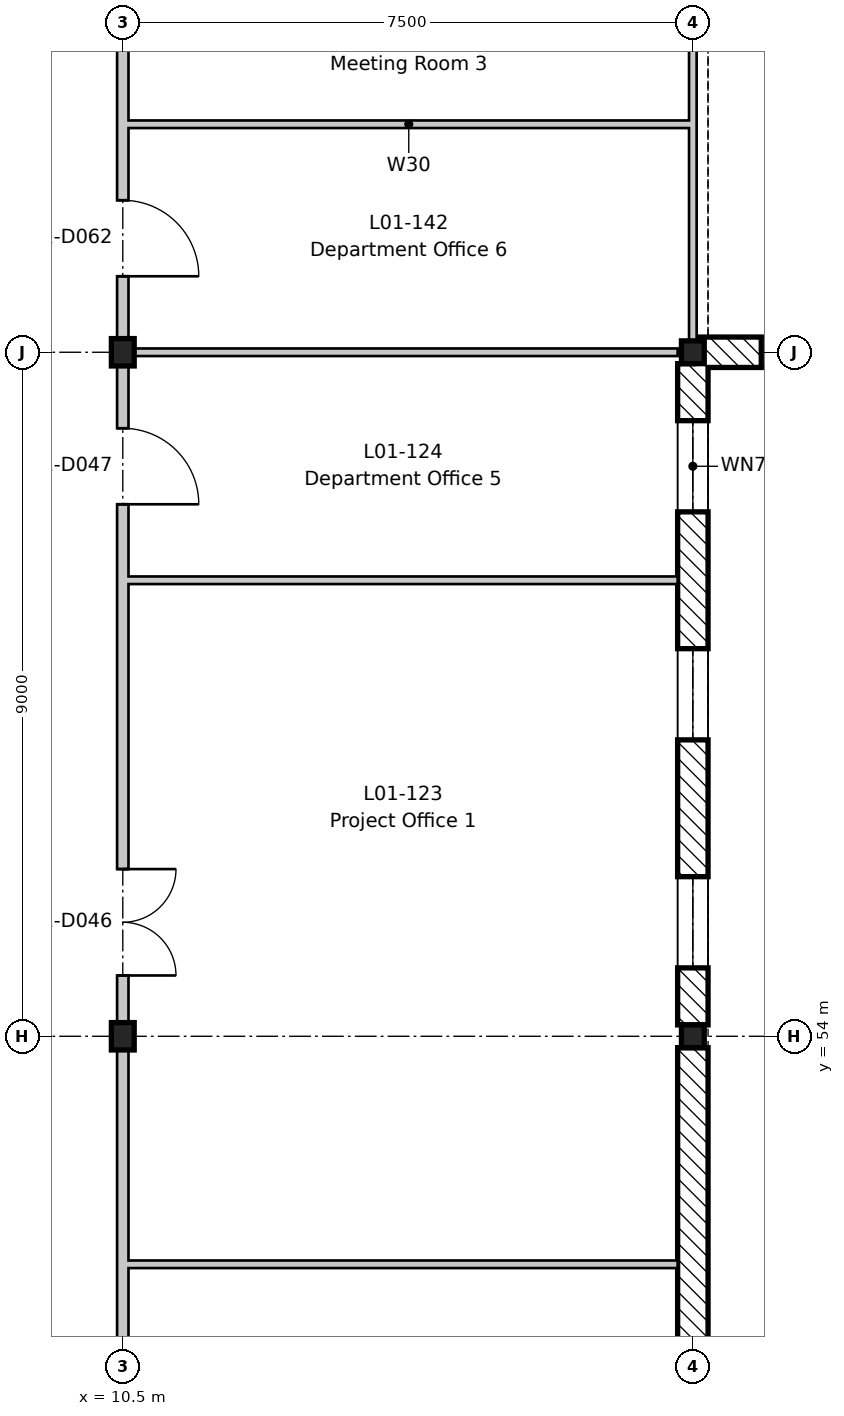
"""IFC4 building model, lengths in metres.
Left out: names, types, materials, properties, quantities, classifications, styles, units other than length and angle.
Written with IfcOpenShell. Run it as: python <this file> out.ifc"""

import sys

from ifc_helpers import new_model, si_unit, direction, frame, frame_2d, origin, origin_2d, place, context, subcontext, project, spatial, rectangle, i_section, extrude, element, fill, save


model = new_model("IFC4")
c1 = context("Model", 3, precision=1e-05, world=origin(), true_north=direction((0.0, 1.0)))
c2 = subcontext(c1, "Body", "Model", "MODEL_VIEW")
j1 = project(units=[si_unit("LENGTHUNIT", "METRE"), si_unit("PLANEANGLEUNIT", "RADIAN")], contexts=[c1])
p1 = place(None, origin())
s1 = spatial("IfcSite", under=j1, at=p1, CompositionType="ELEMENT")
p2 = place(p1, origin())
s2 = spatial("IfcBuilding", under=s1, at=p2, CompositionType="ELEMENT")
p3 = place(p2, frame((0.0, 0.0, 5.4)))
s3 = spatial("IfcBuildingStorey", under=s2, at=p3, CompositionType="ELEMENT", Elevation=5.4)
for number, where, z_axis, x_axis in (
    (1, (10.5, 54.0, -0.2), (0.0, 0.0, 1.0), (1.0, 0.0, 0.0)),
    (2, (10.5, 63.0, -0.2), (0.0, 0.0, 1.0), (1.0, 0.0, 0.0)),
):
    element("IfcColumn", number, at=place(p3, frame(where, z_axis=z_axis, x_axis=x_axis)), inside=s3, PredefinedType="COLUMN", context=c2, shape_type="SweptSolid", body=[
        extrude(i_section(OverallWidth=0.3, OverallDepth=0.36, WebThickness=0.012, FlangeThickness=0.022, FilletRadius=0.027, at=origin_2d()), origin(), (0.0, 0.0, 1.0), 4.5),
    ])
for number, where, z_axis, x_axis in (
    (3, (18.0, 54.0, -0.2), (0.0, 0.0, 1.0), (1.0, 0.0, 0.0)),
    (4, (18.0, 63.0, -0.2), (0.0, 0.0, 1.0), (1.0, 0.0, 0.0)),
):
    element("IfcColumn", number, at=place(p3, frame(where, z_axis=z_axis, x_axis=x_axis)), inside=s3, PredefinedType="COLUMN", context=c2, shape_type="SweptSolid", body=[
        extrude(i_section(OverallWidth=0.3, OverallDepth=0.3, WebThickness=0.011, FlangeThickness=0.019, FilletRadius=0.027, at=origin_2d()), origin(), (0.0, 0.0, 1.0), 4.5),
    ])
p4 = place(p3, frame((18.0, 53.85, 0.0), z_axis=(0.0, 0.0, 1.0), x_axis=(0.0, -1.0, 0.0)))
e5 = element("IfcWall", 5, at=p4, inside=s3, PredefinedType="STANDARD", context=c2, shape_type="SweptSolid", body=[
    extrude(rectangle(XDim=8.7, YDim=0.4, at=frame_2d((4.35, 0.0))), origin(), (0.0, 0.0, 1.0), 3.9),
])
p5 = place(p3, frame((18.0, 62.85, 0.0), z_axis=(0.0, 0.0, 1.0), x_axis=(0.0, -1.0, 0.0)))
e6 = element("IfcWall", 6, at=p5, inside=s3, PredefinedType="STANDARD", context=c2, shape_type="SweptSolid", body=[
    extrude(rectangle(XDim=8.7, YDim=0.4, at=frame_2d((4.35, 0.0))), origin(), (0.0, 0.0, 1.0), 3.9),
])
p6 = place(p5, frame((6.75, 0.0, 0.9)))
e7 = element("IfcOpeningElement", 7, at=p6, cuts=e6, PredefinedType="OPENING", context=c2, shape_type="SweptSolid", body=[
    extrude(rectangle(XDim=1.2, YDim=2.4, at=frame_2d((0.6, 1.2))), frame((0.0, 0.21, 0.0), z_axis=(0.0, -1.0, 0.0), x_axis=(1.0, 0.0, 0.0)), (0.0, 0.0, 1.0), 0.42),
])
p7 = place(p5, frame((3.75, 0.0, 0.9)))
e8 = element("IfcOpeningElement", 8, at=p7, cuts=e6, PredefinedType="OPENING", context=c2, shape_type="SweptSolid", body=[
    extrude(rectangle(XDim=1.2, YDim=2.4, at=frame_2d((0.6, 1.2))), frame((0.0, 0.21, 0.0), z_axis=(0.0, -1.0, 0.0), x_axis=(1.0, 0.0, 0.0)), (0.0, 0.0, 1.0), 0.42),
])
p8 = place(p5, frame((0.75, 0.0, 0.9)))
e9 = element("IfcOpeningElement", 9, at=p8, cuts=e6, PredefinedType="OPENING", context=c2, shape_type="SweptSolid", body=[
    extrude(rectangle(XDim=1.2, YDim=2.4, at=frame_2d((0.6, 1.2))), frame((0.0, 0.21, 0.0), z_axis=(0.0, -1.0, 0.0), x_axis=(1.0, 0.0, 0.0)), (0.0, 0.0, 1.0), 0.42),
])
p9 = place(p3, frame((26.991, 63.0, 0.0), z_axis=(0.0, 0.0, 1.0), x_axis=(-1.0, 0.0, 0.0)))
e10 = element("IfcWall", 10, at=p9, inside=s3, PredefinedType="STANDARD", context=c2, shape_type="SweptSolid", body=[
    extrude(rectangle(XDim=8.98, YDim=0.4, at=frame_2d((4.49, 0.0))), origin(), (0.0, 0.0, 1.0), 3.9),
])
p10 = place(p9, frame((6.891, 0.0, 0.9)))
e11 = element("IfcOpeningElement", 11, at=p10, cuts=e10, PredefinedType="OPENING", context=c2, shape_type="SweptSolid", body=[
    extrude(rectangle(XDim=1.2, YDim=2.4, at=frame_2d((0.6, 1.2))), frame((0.0, 0.21, 0.0), z_axis=(0.0, -1.0, 0.0), x_axis=(1.0, 0.0, 0.0)), (0.0, 0.0, 1.0), 0.42),
])
p11 = place(p9, frame((3.891, 0.0, 0.9)))
e12 = element("IfcOpeningElement", 12, at=p11, cuts=e10, PredefinedType="OPENING", context=c2, shape_type="SweptSolid", body=[
    extrude(rectangle(XDim=1.2, YDim=2.4, at=frame_2d((0.6, 1.2))), frame((0.0, 0.21, 0.0), z_axis=(0.0, -1.0, 0.0), x_axis=(1.0, 0.0, 0.0)), (0.0, 0.0, 1.0), 0.42),
])
p12 = place(p9, frame((0.891, 0.0, 0.9)))
e13 = element("IfcOpeningElement", 13, at=p12, cuts=e10, PredefinedType="OPENING", context=c2, shape_type="SweptSolid", body=[
    extrude(rectangle(XDim=1.2, YDim=2.4, at=frame_2d((0.6, 1.2))), frame((0.0, 0.21, 0.0), z_axis=(0.0, -1.0, 0.0), x_axis=(1.0, 0.0, 0.0)), (0.0, 0.0, 1.0), 0.42),
])
for number, where, z_axis, x_axis in (
    (14, (10.575, 51.0, 0.0), (0.0, 0.0, 1.0), (1.0, 0.0, 0.0)),
    (15, (10.575, 60.0, 0.0), (0.0, 0.0, 1.0), (1.0, 0.0, 0.0)),
):
    element("IfcWall", number, at=place(p3, frame(where, z_axis=z_axis, x_axis=x_axis)), inside=s3, PredefinedType="PARTITIONING", context=c2, shape_type="SweptSolid", body=[
        extrude(rectangle(XDim=7.225, YDim=0.1, at=frame_2d((3.613, 0.0))), origin(), (0.0, 0.0, 1.0), 4.3),
    ])
p13 = place(p3, frame((10.575, 63.0, 0.0), z_axis=(0.0, 0.0, 1.0), x_axis=(1.0, 0.0, 0.0)))
e16 = element("IfcWall", 16, at=p13, inside=s3, PredefinedType="PARTITIONING", context=c2, shape_type="SweptSolid", body=[
    extrude(rectangle(XDim=7.225, YDim=0.1, at=frame_2d((3.613, 0.0))), origin(), (0.0, 0.0, 1.0), 3.95),
])
p14 = place(p3, frame((10.5, -8.8, 0.0), z_axis=(0.0, 0.0, 1.0), x_axis=(0.0, 1.0, 0.0)))
e17 = element("IfcWall", 17, at=p14, inside=s3, PredefinedType="PARTITIONING", context=c2, shape_type="SweptSolid", body=[
    extrude(rectangle(XDim=79.3, YDim=0.15, at=frame_2d((39.65, 0.0))), origin(), (0.0, 0.0, 1.0), 3.78),
])
p15 = place(p14, frame((0.8, 0.0, 0.0)))
e18 = element("IfcOpeningElement", 18, at=p15, cuts=e17, PredefinedType="OPENING", context=c2, shape_type="SweptSolid", body=[
    extrude(rectangle(XDim=1.0, YDim=2.1, at=frame_2d((0.5, 1.05))), frame((0.0, 0.085, 0.0), z_axis=(0.0, -1.0, 0.0), x_axis=(1.0, 0.0, 0.0)), (0.0, 0.0, 1.0), 0.17),
])
p16 = place(p14, frame((5.3, 0.0, 0.0)))
e19 = element("IfcOpeningElement", 19, at=p16, cuts=e17, PredefinedType="OPENING", context=c2, shape_type="SweptSolid", body=[
    extrude(rectangle(XDim=1.0, YDim=2.1, at=frame_2d((0.5, 1.05))), frame((0.0, 0.085, 0.0), z_axis=(0.0, -1.0, 0.0), x_axis=(1.0, 0.0, 0.0)), (0.0, 0.0, 1.0), 0.17),
])
p17 = place(p14, frame((11.3, 0.0, 0.0)))
e20 = element("IfcOpeningElement", 20, at=p17, cuts=e17, PredefinedType="OPENING", context=c2, shape_type="SweptSolid", body=[
    extrude(rectangle(XDim=1.0, YDim=2.1, at=frame_2d((0.5, 1.05))), frame((0.0, 0.085, 0.0), z_axis=(0.0, -1.0, 0.0), x_axis=(1.0, 0.0, 0.0)), (0.0, 0.0, 1.0), 0.17),
])
p18 = place(p14, frame((15.8, 0.0, 0.0)))
e21 = element("IfcOpeningElement", 21, at=p18, cuts=e17, PredefinedType="OPENING", context=c2, shape_type="SweptSolid", body=[
    extrude(rectangle(XDim=1.0, YDim=2.1, at=frame_2d((0.5, 1.05))), frame((0.0, 0.085, 0.0), z_axis=(0.0, -1.0, 0.0), x_axis=(1.0, 0.0, 0.0)), (0.0, 0.0, 1.0), 0.17),
])
p19 = place(p14, frame((18.8, 0.0, 0.0)))
e22 = element("IfcOpeningElement", 22, at=p19, cuts=e17, PredefinedType="OPENING", context=c2, shape_type="SweptSolid", body=[
    extrude(rectangle(XDim=1.0, YDim=2.1, at=frame_2d((0.5, 1.05))), frame((0.0, 0.085, 0.0), z_axis=(0.0, -1.0, 0.0), x_axis=(1.0, 0.0, 0.0)), (0.0, 0.0, 1.0), 0.17),
])
p20 = place(p14, frame((23.3, 0.0, 0.0)))
e23 = element("IfcOpeningElement", 23, at=p20, cuts=e17, PredefinedType="OPENING", context=c2, shape_type="SweptSolid", body=[
    extrude(rectangle(XDim=1.0, YDim=2.1, at=frame_2d((0.5, 1.05))), frame((0.0, 0.085, 0.0), z_axis=(0.0, -1.0, 0.0), x_axis=(1.0, 0.0, 0.0)), (0.0, 0.0, 1.0), 0.17),
])
p21 = place(p14, frame((29.3, 0.0, 0.0)))
e24 = element("IfcOpeningElement", 24, at=p21, cuts=e17, PredefinedType="OPENING", context=c2, shape_type="SweptSolid", body=[
    extrude(rectangle(XDim=1.0, YDim=2.1, at=frame_2d((0.5, 1.05))), frame((0.0, 0.085, 0.0), z_axis=(0.0, -1.0, 0.0), x_axis=(1.0, 0.0, 0.0)), (0.0, 0.0, 1.0), 0.17),
])
p22 = place(p14, frame((33.8, 0.0, 0.0)))
e25 = element("IfcOpeningElement", 25, at=p22, cuts=e17, PredefinedType="OPENING", context=c2, shape_type="SweptSolid", body=[
    extrude(rectangle(XDim=1.0, YDim=2.1, at=frame_2d((0.5, 1.05))), frame((0.0, 0.085, 0.0), z_axis=(0.0, -1.0, 0.0), x_axis=(1.0, 0.0, 0.0)), (0.0, 0.0, 1.0), 0.17),
])
p23 = place(p14, frame((38.3, 0.0, 0.0)))
e26 = element("IfcOpeningElement", 26, at=p23, cuts=e17, PredefinedType="OPENING", context=c2, shape_type="SweptSolid", body=[
    extrude(rectangle(XDim=1.0, YDim=2.1, at=frame_2d((0.5, 1.05))), frame((0.0, 0.085, 0.0), z_axis=(0.0, -1.0, 0.0), x_axis=(1.0, 0.0, 0.0)), (0.0, 0.0, 1.0), 0.17),
])
p24 = place(p14, frame((42.8, 0.0, 0.0)))
e27 = element("IfcOpeningElement", 27, at=p24, cuts=e17, PredefinedType="OPENING", context=c2, shape_type="SweptSolid", body=[
    extrude(rectangle(XDim=1.0, YDim=2.1, at=frame_2d((0.5, 1.05))), frame((0.0, 0.085, 0.0), z_axis=(0.0, -1.0, 0.0), x_axis=(1.0, 0.0, 0.0)), (0.0, 0.0, 1.0), 0.17),
])
p25 = place(p14, frame((45.8, 0.0, 0.0)))
e28 = element("IfcOpeningElement", 28, at=p25, cuts=e17, PredefinedType="OPENING", context=c2, shape_type="SweptSolid", body=[
    extrude(rectangle(XDim=1.0, YDim=2.1, at=frame_2d((0.5, 1.05))), frame((0.0, 0.085, 0.0), z_axis=(0.0, -1.0, 0.0), x_axis=(1.0, 0.0, 0.0)), (0.0, 0.0, 1.0), 0.17),
])
p26 = place(p14, frame((50.3, 0.0, 0.0)))
e29 = element("IfcOpeningElement", 29, at=p26, cuts=e17, PredefinedType="OPENING", context=c2, shape_type="SweptSolid", body=[
    extrude(rectangle(XDim=1.0, YDim=2.1, at=frame_2d((0.5, 1.05))), frame((0.0, 0.085, 0.0), z_axis=(0.0, -1.0, 0.0), x_axis=(1.0, 0.0, 0.0)), (0.0, 0.0, 1.0), 0.17),
])
p27 = place(p14, frame((54.8, 0.0, 0.0)))
e30 = element("IfcOpeningElement", 30, at=p27, cuts=e17, PredefinedType="OPENING", context=c2, shape_type="SweptSolid", body=[
    extrude(rectangle(XDim=1.0, YDim=2.1, at=frame_2d((0.5, 1.05))), frame((0.0, 0.085, 0.0), z_axis=(0.0, -1.0, 0.0), x_axis=(1.0, 0.0, 0.0)), (0.0, 0.0, 1.0), 0.17),
])
p28 = place(p14, frame((57.8, 0.0, 0.0)))
e31 = element("IfcOpeningElement", 31, at=p28, cuts=e17, PredefinedType="OPENING", context=c2, shape_type="SweptSolid", body=[
    extrude(rectangle(XDim=1.0, YDim=2.1, at=frame_2d((0.5, 1.05))), frame((0.0, 0.085, 0.0), z_axis=(0.0, -1.0, 0.0), x_axis=(1.0, 0.0, 0.0)), (0.0, 0.0, 1.0), 0.17),
])
p29 = place(p14, frame((63.6, 0.0, 0.0)))
e32 = element("IfcOpeningElement", 32, at=p29, cuts=e17, PredefinedType="OPENING", context=c2, shape_type="SweptSolid", body=[
    extrude(rectangle(XDim=1.4, YDim=2.1, at=frame_2d((0.7, 1.05))), frame((0.0, 0.085, 0.0), z_axis=(0.0, -1.0, 0.0), x_axis=(1.0, 0.0, 0.0)), (0.0, 0.0, 1.0), 0.17),
])
p30 = place(p14, frame((69.8, 0.0, 0.0)))
e33 = element("IfcOpeningElement", 33, at=p30, cuts=e17, PredefinedType="OPENING", context=c2, shape_type="SweptSolid", body=[
    extrude(rectangle(XDim=1.0, YDim=2.1, at=frame_2d((0.5, 1.05))), frame((0.0, 0.085, 0.0), z_axis=(0.0, -1.0, 0.0), x_axis=(1.0, 0.0, 0.0)), (0.0, 0.0, 1.0), 0.17),
])
p31 = place(p14, frame((72.8, 0.0, 0.0)))
e34 = element("IfcOpeningElement", 34, at=p31, cuts=e17, PredefinedType="OPENING", context=c2, shape_type="SweptSolid", body=[
    extrude(rectangle(XDim=1.0, YDim=2.1, at=frame_2d((0.5, 1.05))), frame((0.0, 0.085, 0.0), z_axis=(0.0, -1.0, 0.0), x_axis=(1.0, 0.0, 0.0)), (0.0, 0.0, 1.0), 0.17),
])
p32 = place(p3, frame((10.575, 66.0, 0.0), z_axis=(0.0, 0.0, 1.0), x_axis=(1.0, 0.0, 0.0)))
e35 = element("IfcWall", 35, at=p32, inside=s3, PredefinedType="PARTITIONING", context=c2, shape_type="SweptSolid", body=[
    extrude(rectangle(XDim=7.375, YDim=0.1, at=frame_2d((3.688, 0.0))), origin(), (0.0, 0.0, 1.0), 4.3),
])
p33 = place(p3, frame((18.0, 63.075, 0.0), z_axis=(0.0, 0.0, 1.0), x_axis=(0.0, 1.0, 0.0)))
e36 = element("IfcWall", 36, at=p33, inside=s3, PredefinedType="PARTITIONING", context=c2, shape_type="SweptSolid", body=[
    extrude(rectangle(XDim=7.35, YDim=0.1, at=frame_2d((3.675, 0.0))), origin(), (0.0, 0.0, 1.0), 3.88),
])
p34 = place(p6, origin())
e37 = element("IfcWindow", 37, at=p34, inside=s3, PartitioningType="SINGLE_PANEL", PredefinedType="WINDOW", context=c2, shape_type="SweptSolid", body=[
    extrude(rectangle(XDim=1.2, YDim=2.4, at=frame_2d((0.6, 1.2))), frame((0.0, -0.12, 0.0), z_axis=(0.0, -1.0, 0.0), x_axis=(1.0, 0.0, 0.0)), (0.0, 0.0, 1.0), 0.06),
])
fill(e7, e37)
p35 = place(p7, origin())
e38 = element("IfcWindow", 38, at=p35, inside=s3, PartitioningType="SINGLE_PANEL", PredefinedType="WINDOW", context=c2, shape_type="SweptSolid", body=[
    extrude(rectangle(XDim=1.2, YDim=2.4, at=frame_2d((0.6, 1.2))), frame((0.0, -0.12, 0.0), z_axis=(0.0, -1.0, 0.0), x_axis=(1.0, 0.0, 0.0)), (0.0, 0.0, 1.0), 0.06),
])
fill(e8, e38)
p36 = place(p8, origin())
e39 = element("IfcWindow", 39, at=p36, inside=s3, PartitioningType="SINGLE_PANEL", PredefinedType="WINDOW", context=c2, shape_type="SweptSolid", body=[
    extrude(rectangle(XDim=1.2, YDim=2.4, at=frame_2d((0.6, 1.2))), frame((0.0, -0.12, 0.0), z_axis=(0.0, -1.0, 0.0), x_axis=(1.0, 0.0, 0.0)), (0.0, 0.0, 1.0), 0.06),
])
fill(e9, e39)
p37 = place(p10, origin())
e40 = element("IfcWindow", 40, at=p37, inside=s3, PartitioningType="SINGLE_PANEL", PredefinedType="WINDOW", context=c2, shape_type="SweptSolid", body=[
    extrude(rectangle(XDim=1.2, YDim=2.4, at=frame_2d((0.6, 1.2))), frame((0.0, -0.12, 0.0), z_axis=(0.0, -1.0, 0.0), x_axis=(1.0, 0.0, 0.0)), (0.0, 0.0, 1.0), 0.06),
])
fill(e11, e40)
p38 = place(p29, frame((1.4, 0.0, 0.0), z_axis=(0.0, 0.0, 1.0), x_axis=(-1.0, 0.0, 0.0)))
e41 = element("IfcDoor", 41, at=p38, inside=s3, OperationType="DOUBLE_DOOR_SINGLE_SWING", PredefinedType="DOOR", context=c2, shape_type="SweptSolid", body=[
    extrude(rectangle(XDim=1.4, YDim=2.1, at=frame_2d((0.7, 1.05))), frame((0.0, 0.025, 0.0), z_axis=(0.0, -1.0, 0.0), x_axis=(1.0, 0.0, 0.0)), (0.0, 0.0, 1.0), 0.05),
])
fill(e32, e41)
p39 = place(p30, frame((1.0, 0.0, 0.0), z_axis=(0.0, 0.0, 1.0), x_axis=(-1.0, 0.0, 0.0)))
e42 = element("IfcDoor", 42, at=p39, inside=s3, OperationType="SINGLE_SWING_RIGHT", PredefinedType="DOOR", context=c2, shape_type="SweptSolid", body=[
    extrude(rectangle(XDim=1.0, YDim=2.1, at=frame_2d((0.5, 1.05))), frame((0.0, 0.025, 0.0), z_axis=(0.0, -1.0, 0.0), x_axis=(1.0, 0.0, 0.0)), (0.0, 0.0, 1.0), 0.05),
])
fill(e33, e42)
p40 = place(p31, frame((1.0, 0.0, 0.0), z_axis=(0.0, 0.0, 1.0), x_axis=(-1.0, 0.0, 0.0)))
e43 = element("IfcDoor", 43, at=p40, inside=s3, OperationType="SINGLE_SWING_RIGHT", PredefinedType="DOOR", context=c2, shape_type="SweptSolid", body=[
    extrude(rectangle(XDim=1.0, YDim=2.1, at=frame_2d((0.5, 1.05))), frame((0.0, 0.025, 0.0), z_axis=(0.0, -1.0, 0.0), x_axis=(1.0, 0.0, 0.0)), (0.0, 0.0, 1.0), 0.05),
])
fill(e34, e43)
save(model, sys.argv[1])
